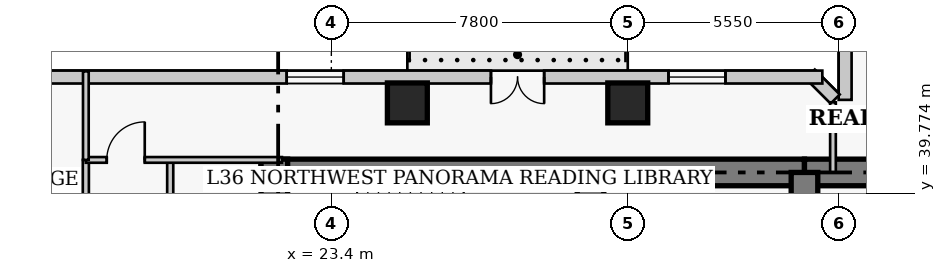
"""IFC4 building model, lengths in metres.
Left out: names, types, materials, properties, quantities, classifications, styles, units other than length and angle.
Written with IfcOpenShell. Run it as: python <this file> out.ifc"""

import sys

from ifc_helpers import new_model, si_unit, direction, frame, frame_2d, origin, origin_2d, place, context, subcontext, project, spatial, rectangle, extrude, element, fill, save


model = new_model("IFC4")
c1 = context("Model", 3, precision=1e-05, world=origin(), true_north=direction((0.0, 1.0)))
c2 = subcontext(c1, "Body", "Model", "MODEL_VIEW")
j1 = project(units=[si_unit("LENGTHUNIT", "METRE"), si_unit("PLANEANGLEUNIT", "RADIAN")], contexts=[c1])
p1 = place(None, origin())
s1 = spatial("IfcSite", under=j1, at=p1, CompositionType="ELEMENT")
p2 = place(p1, origin())
s2 = spatial("IfcBuilding", under=s1, at=p2, CompositionType="ELEMENT")
p3 = place(p2, frame((0.0, 0.0, 146.0)))
s3 = spatial("IfcBuildingStorey", under=s2, at=p3, CompositionType="ELEMENT", Elevation=146.0)
p4 = place(p3, frame((21.55, 40.32, 0.0), z_axis=(0.0, 0.0, 1.0), x_axis=(1.0, 0.0, 0.0)))
e1 = element("IfcWall", 1, at=p4, inside=s3, PredefinedType="SHEAR", context=c2, shape_type="SweptSolid", body=[
    extrude(rectangle(XDim=14.3, YDim=0.7, at=frame_2d((7.15, 0.0))), origin(), (0.0, 0.0, 1.0), 3.8),
])
p5 = place(p3, frame((35.85, 40.32, 0.0), z_axis=(0.0, 0.0, 1.0), x_axis=(1.0, 0.0, 0.0)))
e2 = element("IfcWall", 2, at=p5, inside=s3, PredefinedType="SHEAR", context=c2, shape_type="SweptSolid", body=[
    extrude(rectangle(XDim=12.6, YDim=0.7, at=frame_2d((6.3, 0.0))), origin(), (0.0, 0.0, 1.0), 3.8),
])
p6 = place(p3, frame((21.9, 27.05, 0.0), z_axis=(0.0, 0.0, 1.0), x_axis=(0.0, 1.0, 0.0)))
e3 = element("IfcWall", 3, at=p6, inside=s3, PredefinedType="SHEAR", context=c2, shape_type="SweptSolid", body=[
    extrude(rectangle(XDim=13.62, YDim=0.7, at=frame_2d((6.81, 0.0))), origin(), (0.0, 0.0, 1.0), 3.8),
])
p7 = place(p3, frame((30.22, 33.1, 0.0), z_axis=(0.0, 0.0, 1.0), x_axis=(0.0, 1.0, 0.0)))
e4 = element("IfcWall", 4, at=p7, inside=s3, PredefinedType="SHEAR", context=c2, shape_type="SweptSolid", body=[
    extrude(rectangle(XDim=7.22, YDim=0.7, at=frame_2d((3.61, 0.0))), origin(), (0.0, 0.0, 1.0), 3.8),
])
p8 = place(p3, frame((35.85, 36.37, 0.0), z_axis=(0.0, 0.0, 1.0), x_axis=(0.0, 1.0, 0.0)))
e5 = element("IfcWall", 5, at=p8, inside=s3, PredefinedType="SHEAR", context=c2, shape_type="SweptSolid", body=[
    extrude(rectangle(XDim=3.95, YDim=0.7, at=frame_2d((1.975, 0.0))), origin(), (0.0, 0.0, 1.0), 3.8),
])
p9 = place(p8, frame((0.88, 0.0, 0.0)))
e6 = element("IfcOpeningElement", 6, at=p9, cuts=e5, PredefinedType="OPENING", context=c2, shape_type="SweptSolid", body=[
    extrude(rectangle(XDim=1.1, YDim=2.15, at=frame_2d((0.55, 1.075))), frame((0.0, 0.36, 0.0), z_axis=(0.0, -1.0, 0.0), x_axis=(1.0, 0.0, 0.0)), (0.0, 0.0, 1.0), 0.72),
])
for number, where, z_axis, x_axis in (
    (7, (25.4, 42.15, 0.0), (0.0, 0.0, 1.0), (1.0, 0.0, 0.0)),
    (8, (31.2, 42.15, 0.0), (0.0, 0.0, 1.0), (1.0, 0.0, 0.0)),
):
    element("IfcColumn", number, at=place(p3, frame(where, z_axis=z_axis, x_axis=x_axis)), inside=s3, PredefinedType="COLUMN", context=c2, shape_type="SweptSolid", body=[
        extrude(rectangle(XDim=1.05, YDim=1.05, at=origin_2d()), origin(), (0.0, 0.0, 1.0), 3.8),
    ])
p10 = place(p3, frame((36.92, 44.37, 0.0), z_axis=(0.0, 0.0, 1.0), x_axis=(0.0, -1.0, 0.0)))
e9 = element("IfcWall", 9, at=p10, inside=s3, PredefinedType="SOLIDWALL", context=c2, shape_type="SweptSolid", body=[
    extrude(rectangle(XDim=2.14, YDim=0.34, at=frame_2d((1.07, 0.0))), origin(), (0.0, 0.0, 1.0), 3.55),
])
p11 = place(p3, frame((36.658, 42.251, 0.0), z_axis=(0.0, 0.0, 1.0), x_axis=(-0.707106781187, 0.707106781187, 0.0)))
e10 = element("IfcWall", 10, at=p11, inside=s3, PredefinedType="SOLIDWALL", context=c2, shape_type="SweptSolid", body=[
    extrude(rectangle(XDim=0.929, YDim=0.34, at=frame_2d((0.464, 0.0))), origin(), (0.0, 0.0, 1.0), 3.55),
])
p12 = place(p3, frame((36.32, 42.83, 0.0), z_axis=(0.0, 0.0, 1.0), x_axis=(-1.0, 0.0, 0.0)))
e11 = element("IfcWall", 11, at=p12, inside=s3, PredefinedType="SOLIDWALL", context=c2, shape_type="SweptSolid", body=[
    extrude(rectangle(XDim=26.69, YDim=0.34, at=frame_2d((13.345, 0.0))), origin(), (0.0, 0.0, 1.0), 3.55),
])
p13 = place(p12, frame((7.32, 0.0, 0.0)))
e12 = element("IfcOpeningElement", 12, at=p13, cuts=e11, PredefinedType="OPENING", context=c2, shape_type="SweptSolid", body=[
    extrude(rectangle(XDim=1.4, YDim=2.15, at=frame_2d((0.7, 1.075))), frame((0.0, 0.18, 0.0), z_axis=(0.0, -1.0, 0.0), x_axis=(1.0, 0.0, 0.0)), (0.0, 0.0, 1.0), 0.36),
])
p14 = place(p12, frame((2.548, 0.0, 0.85)))
e13 = element("IfcOpeningElement", 13, at=p14, cuts=e11, PredefinedType="OPENING", context=c2, shape_type="SweptSolid", body=[
    extrude(rectangle(XDim=1.5, YDim=1.75, at=frame_2d((0.75, 0.875))), frame((0.0, 0.18, 0.0), z_axis=(0.0, -1.0, 0.0), x_axis=(1.0, 0.0, 0.0)), (0.0, 0.0, 1.0), 0.36),
])
p15 = place(p12, frame((12.595, 0.0, 0.85)))
e14 = element("IfcOpeningElement", 14, at=p15, cuts=e11, PredefinedType="OPENING", context=c2, shape_type="SweptSolid", body=[
    extrude(rectangle(XDim=1.5, YDim=1.75, at=frame_2d((0.75, 0.875))), frame((0.0, 0.18, 0.0), z_axis=(0.0, -1.0, 0.0), x_axis=(1.0, 0.0, 0.0)), (0.0, 0.0, 1.0), 0.36),
])
p16 = place(p12, frame((21.492, 0.0, 0.85)))
e15 = element("IfcOpeningElement", 15, at=p16, cuts=e11, PredefinedType="OPENING", context=c2, shape_type="SweptSolid", body=[
    extrude(rectangle(XDim=1.5, YDim=1.75, at=frame_2d((0.75, 0.875))), frame((0.0, 0.18, 0.0), z_axis=(0.0, -1.0, 0.0), x_axis=(1.0, 0.0, 0.0)), (0.0, 0.0, 1.0), 0.36),
])
p17 = place(p3, frame((16.94, 6.85, 0.0), z_axis=(0.0, 0.0, 1.0), x_axis=(0.0, 1.0, 0.0)))
e16 = element("IfcWall", 16, at=p17, inside=s3, PredefinedType="PARTITIONING", context=c2, shape_type="SweptSolid", body=[
    extrude(rectangle(XDim=33.8, YDim=0.16, at=frame_2d((16.9, 0.0))), origin(), (0.0, 0.0, 1.0), 3.55),
])
p18 = place(p17, frame((1.7, 0.0, 0.0)))
e17 = element("IfcOpeningElement", 17, at=p18, cuts=e16, PredefinedType="OPENING", context=c2, shape_type="SweptSolid", body=[
    extrude(rectangle(XDim=0.95, YDim=2.1, at=frame_2d((0.475, 1.05))), frame((0.0, 0.09, 0.0), z_axis=(0.0, -1.0, 0.0), x_axis=(1.0, 0.0, 0.0)), (0.0, 0.0, 1.0), 0.18),
])
p19 = place(p17, frame((8.275, 0.0, 0.0)))
e18 = element("IfcOpeningElement", 18, at=p19, cuts=e16, PredefinedType="OPENING", context=c2, shape_type="SweptSolid", body=[
    extrude(rectangle(XDim=0.95, YDim=2.1, at=frame_2d((0.475, 1.05))), frame((0.0, 0.09, 0.0), z_axis=(0.0, -1.0, 0.0), x_axis=(1.0, 0.0, 0.0)), (0.0, 0.0, 1.0), 0.18),
])
p20 = place(p17, frame((17.075, 0.0, 0.0)))
e19 = element("IfcOpeningElement", 19, at=p20, cuts=e16, PredefinedType="OPENING", context=c2, shape_type="SweptSolid", body=[
    extrude(rectangle(XDim=0.95, YDim=2.1, at=frame_2d((0.475, 1.05))), frame((0.0, 0.09, 0.0), z_axis=(0.0, -1.0, 0.0), x_axis=(1.0, 0.0, 0.0)), (0.0, 0.0, 1.0), 0.18),
])
p21 = place(p17, frame((24.775, 0.0, 0.0)))
e20 = element("IfcOpeningElement", 20, at=p21, cuts=e16, PredefinedType="OPENING", context=c2, shape_type="SweptSolid", body=[
    extrude(rectangle(XDim=0.95, YDim=2.1, at=frame_2d((0.475, 1.05))), frame((0.0, 0.09, 0.0), z_axis=(0.0, -1.0, 0.0), x_axis=(1.0, 0.0, 0.0)), (0.0, 0.0, 1.0), 0.18),
])
p22 = place(p17, frame((29.1, 0.0, 0.0)))
e21 = element("IfcOpeningElement", 21, at=p22, cuts=e16, PredefinedType="OPENING", context=c2, shape_type="SweptSolid", body=[
    extrude(rectangle(XDim=1.0, YDim=2.15, at=frame_2d((0.5, 1.075))), frame((0.0, 0.09, 0.0), z_axis=(0.0, -1.0, 0.0), x_axis=(1.0, 0.0, 0.0)), (0.0, 0.0, 1.0), 0.18),
])
p23 = place(p3, frame((19.16, 35.02, 0.0), z_axis=(0.0, 0.0, 1.0), x_axis=(0.0, 1.0, 0.0)))
e22 = element("IfcWall", 22, at=p23, inside=s3, PredefinedType="PARTITIONING", context=c2, shape_type="SweptSolid", body=[
    extrude(rectangle(XDim=5.63, YDim=0.16, at=frame_2d((2.815, 0.0))), origin(), (0.0, 0.0, 1.0), 3.55),
])
p24 = place(p3, frame((16.94, 40.65, 0.0), z_axis=(0.0, 0.0, 1.0), x_axis=(1.0, 0.0, 0.0)))
e23 = element("IfcWall", 23, at=p24, inside=s3, PredefinedType="PARTITIONING", context=c2, shape_type="SweptSolid", body=[
    extrude(rectangle(XDim=5.16, YDim=0.15, at=frame_2d((2.58, 0.0))), origin(), (0.0, 0.0, 1.0), 3.55),
])
p25 = place(p24, frame((0.55, 0.0, 0.0)))
e24 = element("IfcOpeningElement", 24, at=p25, cuts=e23, PredefinedType="OPENING", context=c2, shape_type="SweptSolid", body=[
    extrude(rectangle(XDim=1.0, YDim=2.15, at=frame_2d((0.5, 1.075))), frame((0.0, 0.085, 0.0), z_axis=(0.0, -1.0, 0.0), x_axis=(1.0, 0.0, 0.0)), (0.0, 0.0, 1.0), 0.17),
])
p26 = place(p3, frame((16.94, 40.65, 0.0), z_axis=(0.0, 0.0, 1.0), x_axis=(0.0, 1.0, 0.0)))
e25 = element("IfcWall", 25, at=p26, inside=s3, PredefinedType="PARTITIONING", context=c2, shape_type="SweptSolid", body=[
    extrude(rectangle(XDim=2.33, YDim=0.15, at=frame_2d((1.165, 0.0))), origin(), (0.0, 0.0, 1.0), 3.55),
])
p27 = place(p3, frame((36.6, 40.32, 0.0), z_axis=(0.0, 0.0, 1.0), x_axis=(0.0, 1.0, 0.0)))
e26 = element("IfcWall", 26, at=p27, inside=s3, PredefinedType="PARTITIONING", context=c2, shape_type="SweptSolid", body=[
    extrude(rectangle(XDim=1.845, YDim=0.15, at=frame_2d((0.922, 0.0))), origin(), (0.0, 0.0, 1.0), 3.55),
])
p28 = place(p13, origin())
e27 = element("IfcDoor", 27, at=p28, inside=s3, OperationType="DOUBLE_DOOR_SINGLE_SWING", PredefinedType="DOOR", context=c2, shape_type="SweptSolid", body=[
    extrude(rectangle(XDim=1.4, YDim=2.15, at=frame_2d((0.7, 1.075))), frame((0.0, 0.025, 0.0), z_axis=(0.0, -1.0, 0.0), x_axis=(1.0, 0.0, 0.0)), (0.0, 0.0, 1.0), 0.05),
])
fill(e12, e27)
p29 = place(p14, origin())
e28 = element("IfcWindow", 28, at=p29, inside=s3, PartitioningType="SINGLE_PANEL", PredefinedType="WINDOW", context=c2, shape_type="SweptSolid", body=[
    extrude(rectangle(XDim=1.5, YDim=1.75, at=frame_2d((0.75, 0.875))), frame((0.0, 0.03, 0.0), z_axis=(0.0, -1.0, 0.0), x_axis=(1.0, 0.0, 0.0)), (0.0, 0.0, 1.0), 0.06),
])
fill(e13, e28)
p30 = place(p15, origin())
e29 = element("IfcWindow", 29, at=p30, inside=s3, PartitioningType="SINGLE_PANEL", PredefinedType="WINDOW", context=c2, shape_type="SweptSolid", body=[
    extrude(rectangle(XDim=1.5, YDim=1.75, at=frame_2d((0.75, 0.875))), frame((0.0, 0.03, 0.0), z_axis=(0.0, -1.0, 0.0), x_axis=(1.0, 0.0, 0.0)), (0.0, 0.0, 1.0), 0.06),
])
fill(e14, e29)
p31 = place(p25, origin())
e30 = element("IfcDoor", 30, at=p31, inside=s3, OperationType="SINGLE_SWING_RIGHT", PredefinedType="DOOR", context=c2, shape_type="SweptSolid", body=[
    extrude(rectangle(XDim=1.0, YDim=2.15, at=frame_2d((0.5, 1.075))), frame((0.0, 0.025, 0.0), z_axis=(0.0, -1.0, 0.0), x_axis=(1.0, 0.0, 0.0)), (0.0, 0.0, 1.0), 0.05),
])
fill(e24, e30)
save(model, sys.argv[1])
